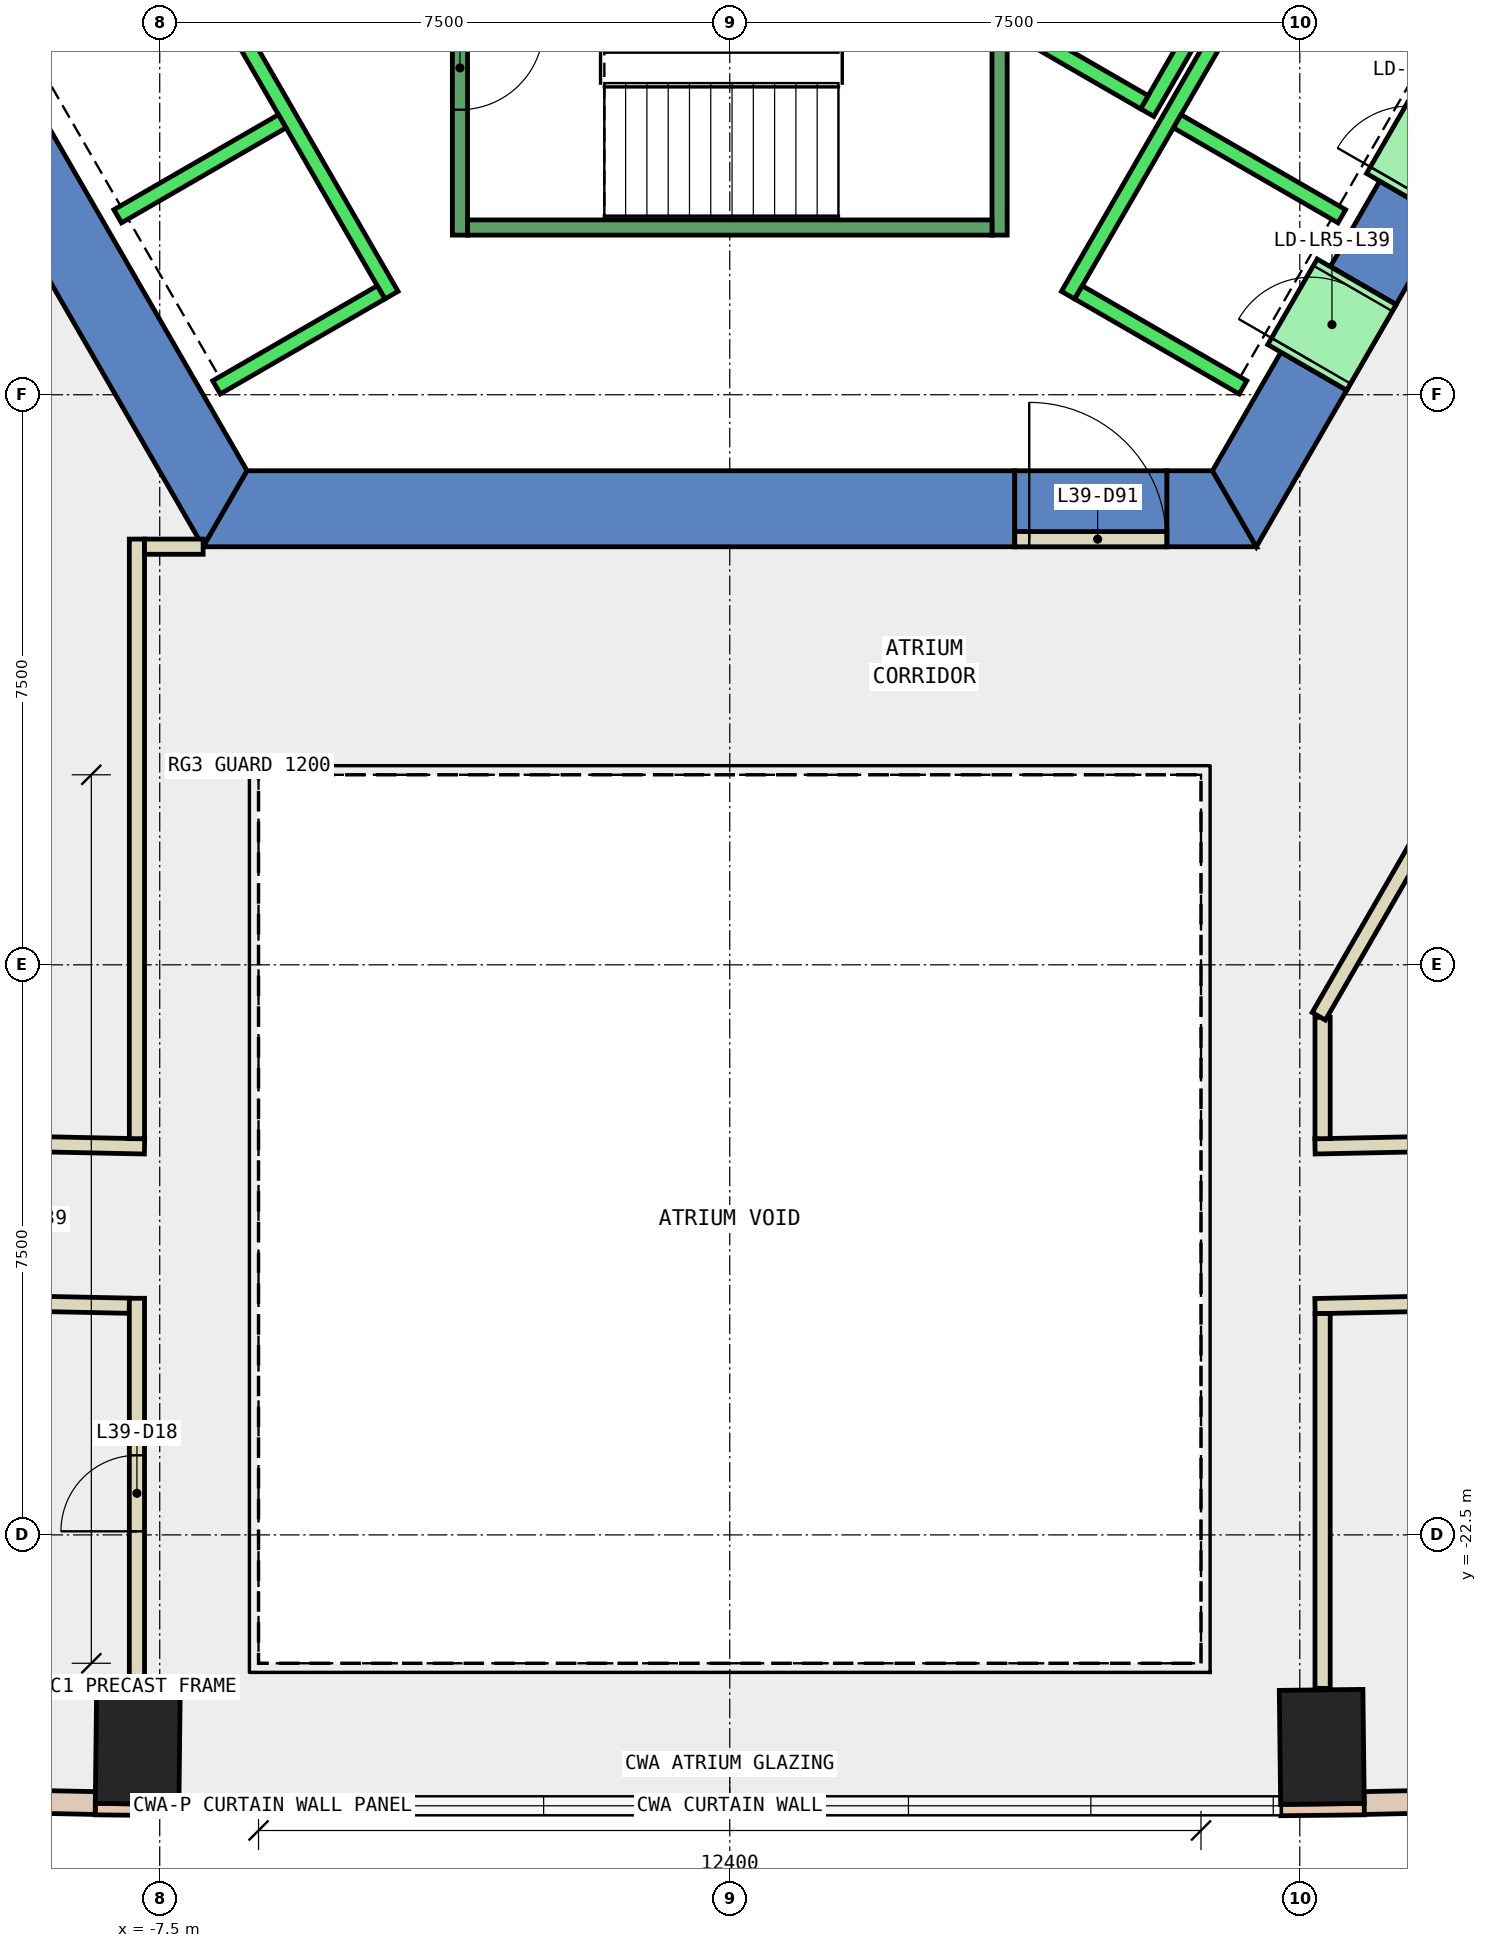
"""IFC4 building model, lengths in metres.
Left out: names, types, materials, properties, quantities, classifications, styles, units other than length and angle.
Written with IfcOpenShell. Run it as: python <this file> out.ifc"""

import sys

from ifc_helpers import new_model, si_unit, direction, frame, frame_2d, origin, origin_2d, place, context, subcontext, project, spatial, polyline, rectangle, outline, extrude, element, fill, save


model = new_model("IFC4")
c1 = context("Model", 3, precision=1e-05, world=origin(), true_north=direction((0.0, 1.0)))
c2 = subcontext(c1, "Body", "Model", "MODEL_VIEW")
j1 = project(units=[si_unit("LENGTHUNIT", "METRE"), si_unit("PLANEANGLEUNIT", "RADIAN")], contexts=[c1])
p1 = place(None, origin())
s1 = spatial("IfcSite", under=j1, at=p1, CompositionType="ELEMENT")
p2 = place(p1, origin())
s2 = spatial("IfcBuilding", under=s1, at=p2, CompositionType="ELEMENT")
p3 = place(p2, frame((0.0, 0.0, 176.0)))
s3 = spatial("IfcBuildingStorey", under=s2, at=p3, CompositionType="ELEMENT", Elevation=176.0)
for number, where, z_axis, x_axis in (
    (1, (-7.789, -25.289, -0.4), (0.0, 0.0, 1.0), (-1.0, 0.012, 0.0)),
    (2, (7.789, -25.289, -0.4), (0.0, 0.0, 1.0), (1.0, 0.012, 0.0)),
):
    element("IfcColumn", number, at=place(p3, frame(where, z_axis=z_axis, x_axis=x_axis)), inside=s3, PredefinedType="COLUMN", context=c2, shape_type="SweptSolid", body=[
        extrude(rectangle(XDim=1.1, YDim=1.5, at=origin_2d()), origin(), (0.0, 0.0, 1.0), 4.2),
    ])
p4 = place(p3, frame((0.0, 0.0, -0.4)))
e3 = element("IfcWall", 3, at=p4, inside=s3, PredefinedType="SHEAR", context=c2, shape_type="SweptSolid", body=[
    extrude(outline(polyline([(-13.856, 2.5), (-6.928, -9.5), (-6.351, -8.5), (-12.702, 2.5), (-13.856, 2.5)])), origin(), (0.0, 0.0, 1.0), 4.2),
])
p5 = place(p3, frame((0.0, 0.0, -0.4)))
e4 = element("IfcWall", 4, at=p5, inside=s3, PredefinedType="SHEAR", context=c2, shape_type="SweptSolid", body=[
    extrude(outline(polyline([(3.75, -9.5), (3.75, -8.5), (-6.351, -8.5), (-6.928, -9.5), (3.75, -9.5)])), origin(), (0.0, 0.0, 1.0), 4.2),
])
p6 = place(p3, frame((0.0, 0.0, -0.4)))
e5 = element("IfcWall", 5, at=p6, inside=s3, PredefinedType="SHEAR", context=c2, shape_type="SweptSolid", body=[
    extrude(outline(polyline([(5.75, -8.5), (5.75, -9.5), (6.928, -9.5), (6.351, -8.5), (5.75, -8.5)])), origin(), (0.0, 0.0, 1.0), 4.2),
])
p7 = place(p3, frame((0.0, 0.0, 3.6)))
e6 = element("IfcWall", 6, at=p7, inside=s3, PredefinedType="SHEAR", context=c2, shape_type="SweptSolid", body=[
    extrude(outline(polyline([(5.75, -9.5), (5.75, -8.5), (3.75, -8.5), (3.75, -9.5), (5.75, -9.5)])), origin(), (0.0, 0.0, 1.0), 0.2),
])
p8 = place(p3, frame((0.0, 0.0, -0.4)))
e7 = element("IfcWall", 7, at=p8, inside=s3, PredefinedType="SHEAR", context=c2, shape_type="SweptSolid", body=[
    extrude(outline(polyline([(8.117, -7.44), (7.252, -6.94), (6.351, -8.5), (6.928, -9.5), (8.117, -7.44)])), origin(), (0.0, 0.0, 1.0), 4.2),
])
p9 = place(p3, frame((0.0, 0.0, -0.4)))
e8 = element("IfcWall", 8, at=p9, inside=s3, PredefinedType="SHEAR", context=c2, shape_type="SweptSolid", body=[
    extrude(outline(polyline([(9.417, -5.189), (8.551, -4.689), (7.902, -5.814), (8.767, -6.314), (9.417, -5.189)])), origin(), (0.0, 0.0, 1.0), 4.2),
])
p10 = place(p3, frame((0.0, 0.0, 3.6)))
e9 = element("IfcWall", 9, at=p10, inside=s3, PredefinedType="SHEAR", context=c2, shape_type="SweptSolid", body=[
    extrude(outline(polyline([(8.767, -6.314), (7.902, -5.814), (7.252, -6.94), (8.117, -7.44), (8.767, -6.314)])), origin(), (0.0, 0.0, 1.0), 0.2),
])
p11 = place(p3, frame((0.0, 0.0, 3.6)))
e10 = element("IfcWall", 10, at=p11, inside=s3, PredefinedType="SHEAR", context=c2, shape_type="SweptSolid", body=[
    extrude(outline(polyline([(10.067, -4.063), (9.201, -3.563), (8.551, -4.689), (9.417, -5.189), (10.067, -4.063)])), origin(), (0.0, 0.0, 1.0), 0.2),
])
for number, where, z_axis, x_axis in (
    (11, (-8.349, -26.108, 0.0), (0.0, 0.0, 1.0), (1.0, -0.011, 0.0)),
    (12, (7.249, -26.12, 0.0), (0.0, 0.0, 1.0), (1.0, 0.011, 0.0)),
):
    element("IfcWall", number, at=place(p3, frame(where, z_axis=z_axis, x_axis=x_axis)), inside=s3, PredefinedType="STANDARD", context=c2, shape_type="SweptSolid", body=[
        extrude(rectangle(XDim=1.1, YDim=0.15, at=frame_2d((0.55, 0.0))), origin(), (0.0, 0.0, 1.0), 3.8),
    ])
p12 = place(p3, frame((-15.68, -25.875, 0.0), z_axis=(0.0, 0.0, 1.0), x_axis=(0.999782189413, -0.020870403275, 0.0)))
e13 = element("IfcWall", 13, at=p12, inside=s3, PredefinedType="STANDARD", context=c2, shape_type="SweptSolid", body=[
    extrude(rectangle(XDim=7.335, YDim=0.3, at=frame_2d((3.667, 0.0))), origin(), (0.0, 0.0, 1.0), 3.8),
])
p13 = place(p12, frame((0.634, 0.0, 0.9)))
e14 = element("IfcOpeningElement", 14, at=p13, cuts=e13, PredefinedType="OPENING", context=c2, shape_type="SweptSolid", body=[
    extrude(rectangle(XDim=2.4, YDim=2.6, at=frame_2d((1.2, 1.3))), frame((0.0, 0.16, 0.0), z_axis=(0.0, -1.0, 0.0), x_axis=(1.0, 0.0, 0.0)), (0.0, 0.0, 1.0), 0.32),
])
p14 = place(p12, frame((4.301, 0.0, 0.9)))
e15 = element("IfcOpeningElement", 15, at=p14, cuts=e13, PredefinedType="OPENING", context=c2, shape_type="SweptSolid", body=[
    extrude(rectangle(XDim=2.4, YDim=2.6, at=frame_2d((1.2, 1.3))), frame((0.0, 0.16, 0.0), z_axis=(0.0, -1.0, 0.0), x_axis=(1.0, 0.0, 0.0)), (0.0, 0.0, 1.0), 0.32),
])
p15 = place(p3, frame((8.347, -26.028, 0.0), z_axis=(0.0, 0.0, 1.0), x_axis=(0.999782189413, 0.020870403275, 0.0)))
e16 = element("IfcWall", 16, at=p15, inside=s3, PredefinedType="STANDARD", context=c2, shape_type="SweptSolid", body=[
    extrude(rectangle(XDim=7.335, YDim=0.3, at=frame_2d((3.667, 0.0))), origin(), (0.0, 0.0, 1.0), 3.8),
])
p16 = place(p15, frame((0.634, 0.0, 0.9)))
e17 = element("IfcOpeningElement", 17, at=p16, cuts=e16, PredefinedType="OPENING", context=c2, shape_type="SweptSolid", body=[
    extrude(rectangle(XDim=2.4, YDim=2.6, at=frame_2d((1.2, 1.3))), frame((0.0, 0.16, 0.0), z_axis=(0.0, -1.0, 0.0), x_axis=(1.0, 0.0, 0.0)), (0.0, 0.0, 1.0), 0.32),
])
p17 = place(p15, frame((4.301, 0.0, 0.9)))
e18 = element("IfcOpeningElement", 18, at=p17, cuts=e16, PredefinedType="OPENING", context=c2, shape_type="SweptSolid", body=[
    extrude(rectangle(XDim=2.4, YDim=2.6, at=frame_2d((1.2, 1.3))), frame((0.0, 0.16, 0.0), z_axis=(0.0, -1.0, 0.0), x_axis=(1.0, 0.0, 0.0)), (0.0, 0.0, 1.0), 0.32),
])
p18 = place(p3, frame((7.7, -17.389, 0.0), z_axis=(0.0, 0.0, 1.0), x_axis=(0.999782442794, 0.020858261713, 0.0)))
e19 = element("IfcWall", 19, at=p18, inside=s3, PredefinedType="PARTITIONING", context=c2, shape_type="SweptSolid", body=[
    extrude(rectangle(XDim=8.287, YDim=0.2, at=frame_2d((4.144, 0.0))), origin(), (0.0, 0.0, 1.0), 3.75),
])
p19 = place(p18, frame((3.644, 0.0, 0.0)))
e20 = element("IfcOpeningElement", 20, at=p19, cuts=e19, PredefinedType="OPENING", context=c2, shape_type="SweptSolid", body=[
    extrude(rectangle(XDim=1.0, YDim=2.1, at=frame_2d((0.5, 1.05))), frame((0.0, 0.11, 0.0), z_axis=(0.0, -1.0, 0.0), x_axis=(1.0, 0.0, 0.0)), (0.0, 0.0, 1.0), 0.22),
])
p20 = place(p3, frame((-15.985, -17.216, 0.0), z_axis=(0.0, 0.0, 1.0), x_axis=(0.999782442794, -0.020858261713, 0.0)))
e21 = element("IfcWall", 21, at=p20, inside=s3, PredefinedType="PARTITIONING", context=c2, shape_type="SweptSolid", body=[
    extrude(rectangle(XDim=8.287, YDim=0.2, at=frame_2d((4.144, 0.0))), origin(), (0.0, 0.0, 1.0), 3.75),
])
p21 = place(p20, frame((3.244, 0.0, 0.0)))
e22 = element("IfcOpeningElement", 22, at=p21, cuts=e21, PredefinedType="OPENING", context=c2, shape_type="SweptSolid", body=[
    extrude(rectangle(XDim=1.8, YDim=2.1, at=frame_2d((0.9, 1.05))), frame((0.0, 0.11, 0.0), z_axis=(0.0, -1.0, 0.0), x_axis=(1.0, 0.0, 0.0)), (0.0, 0.0, 1.0), 0.22),
])
p22 = place(p3, frame((16.045, -19.316, 0.0), z_axis=(0.0, 0.0, 1.0), x_axis=(-0.99978251073, -0.020855005124, 0.0)))
e23 = element("IfcWall", 23, at=p22, inside=s3, PredefinedType="PARTITIONING", context=c2, shape_type="SweptSolid", body=[
    extrude(rectangle(XDim=8.347, YDim=0.2, at=frame_2d((4.173, 0.0))), origin(), (0.0, 0.0, 1.0), 3.75),
])
p23 = place(p22, frame((3.673, 0.0, 0.0)))
e24 = element("IfcOpeningElement", 24, at=p23, cuts=e23, PredefinedType="OPENING", context=c2, shape_type="SweptSolid", body=[
    extrude(rectangle(XDim=1.0, YDim=2.1, at=frame_2d((0.5, 1.05))), frame((0.0, 0.11, 0.0), z_axis=(0.0, -1.0, 0.0), x_axis=(1.0, 0.0, 0.0)), (0.0, 0.0, 1.0), 0.22),
])
p24 = place(p3, frame((-7.9, -19.485, 0.0), z_axis=(0.0, 0.0, 1.0), x_axis=(-0.999784330337, 0.020767590419, 0.0)))
e25 = element("IfcWall", 25, at=p24, inside=s3, PredefinedType="PARTITIONING", context=c2, shape_type="SweptSolid", body=[
    extrude(rectangle(XDim=3.903, YDim=0.2, at=frame_2d((1.951, 0.0))), origin(), (0.0, 0.0, 1.0), 3.75),
])
p25 = place(p3, frame((7.8, -15.69, 0.0), z_axis=(0.0, 0.0, 1.0), x_axis=(0.0, -1.0, 0.0)))
e26 = element("IfcWall", 26, at=p25, inside=s3, PredefinedType="PARTITIONING", context=c2, shape_type="SweptSolid", body=[
    extrude(rectangle(XDim=1.597, YDim=0.2, at=frame_2d((0.799, 0.0))), origin(), (0.0, 0.0, 1.0), 3.75),
])
p26 = place(p3, frame((-7.8, -17.287, 0.0), z_axis=(0.0, 0.0, 1.0), x_axis=(0.0, 1.0, 0.0)))
e27 = element("IfcWall", 27, at=p26, inside=s3, PredefinedType="PARTITIONING", context=c2, shape_type="SweptSolid", body=[
    extrude(rectangle(XDim=7.888, YDim=0.2, at=frame_2d((3.944, 0.0))), origin(), (0.0, 0.0, 1.0), 3.75),
])
p27 = place(p3, frame((-7.7, -9.499, 0.0), z_axis=(0.0, 0.0, 1.0), x_axis=(1.0, 0.0, 0.0)))
e28 = element("IfcWall", 28, at=p27, inside=s3, PredefinedType="PARTITIONING", context=c2, shape_type="SweptSolid", body=[
    extrude(rectangle(XDim=0.771, YDim=0.2, at=frame_2d((0.385, 0.0))), origin(), (0.0, 0.0, 1.0), 3.75),
])
p28 = place(p3, frame((7.8, -19.588, 0.0), z_axis=(0.0, 0.0, 1.0), x_axis=(0.0, -1.0, 0.0)))
e29 = element("IfcWall", 29, at=p28, inside=s3, PredefinedType="PARTITIONING", context=c2, shape_type="SweptSolid", body=[
    extrude(rectangle(XDim=4.931, YDim=0.2, at=frame_2d((2.466, 0.0))), origin(), (0.0, 0.0, 1.0), 3.75),
])
p29 = place(p3, frame((-7.8, -24.519, 0.0), z_axis=(0.0, 0.0, 1.0), x_axis=(0.0, 1.0, 0.0)))
e30 = element("IfcWall", 30, at=p29, inside=s3, PredefinedType="PARTITIONING", context=c2, shape_type="SweptSolid", body=[
    extrude(rectangle(XDim=5.132, YDim=0.2, at=frame_2d((2.566, 0.0))), origin(), (0.0, 0.0, 1.0), 3.75),
])
p30 = place(p29, frame((2.066, 0.0, 0.0)))
e31 = element("IfcOpeningElement", 31, at=p30, cuts=e30, PredefinedType="OPENING", context=c2, shape_type="SweptSolid", body=[
    extrude(rectangle(XDim=1.0, YDim=2.1, at=frame_2d((0.5, 1.05))), frame((0.0, 0.11, 0.0), z_axis=(0.0, -1.0, 0.0), x_axis=(1.0, 0.0, 0.0)), (0.0, 0.0, 1.0), 0.22),
])
p31 = place(p3, frame((12.476, -7.491, 0.0), z_axis=(0.0, 0.0, 1.0), x_axis=(-0.499989258007, -0.866031605588, 0.0)))
e32 = element("IfcWall", 32, at=p31, inside=s3, PredefinedType="PARTITIONING", context=c2, shape_type="SweptSolid", body=[
    extrude(rectangle(XDim=9.452, YDim=0.2, at=frame_2d((4.726, 0.0))), origin(), (0.0, 0.0, 1.0), 3.75),
])
p32 = place(p3, frame((3.75, -9.4, 0.0), z_axis=(0.0, 0.0, 1.0), x_axis=(1.0, 0.0, 0.0)))
e33 = element("IfcWall", 33, at=p32, inside=s3, PredefinedType="PARTITIONING", context=c2, shape_type="SweptSolid", body=[
    extrude(rectangle(XDim=2.0, YDim=0.2, at=frame_2d((1.0, 0.0))), origin(), (0.0, 0.0, 1.0), 2.4),
])
p33 = place(p32, frame((0.19, 0.0, 0.0)))
e34 = element("IfcOpeningElement", 34, at=p33, cuts=e33, PredefinedType="OPENING", context=c2, shape_type="SweptSolid", body=[
    extrude(rectangle(XDim=1.8, YDim=2.1, at=frame_2d((0.9, 1.05))), frame((0.0, 0.11, 0.0), z_axis=(0.0, -1.0, 0.0), x_axis=(1.0, 0.0, 0.0)), (0.0, 0.0, 1.0), 0.22),
])
p34 = place(p3, frame((-9.751, 2.99, 0.0), z_axis=(0.0, 0.0, 1.0), x_axis=(0.50000090737, -0.866024879913, 0.0)))
e35 = element("IfcWall", 35, at=p34, inside=s3, PredefinedType="STANDARD", context=c2, shape_type="SweptSolid", body=[
    extrude(rectangle(XDim=10.6, YDim=0.2, at=frame_2d((5.3, 0.0))), origin(), (0.0, 0.0, 1.0), 3.75),
])
for number, where, z_axis, x_axis in (
    (36, (-5.888, -3.902, 0.0), (0.0, 0.0, 1.0), (-0.866, -0.5, 0.0)),
    (37, (-4.588, -6.153, 0.0), (0.0, 0.0, 1.0), (-0.866, -0.5, 0.0)),
):
    element("IfcWall", number, at=place(p3, frame(where, z_axis=z_axis, x_axis=x_axis)), inside=s3, PredefinedType="STANDARD", context=c2, shape_type="SweptSolid", body=[
        extrude(rectangle(XDim=2.5, YDim=0.2, at=frame_2d((1.25, 0.0))), origin(), (0.0, 0.0, 1.0), 3.75),
    ])
p35 = place(p3, frame((5.492, -3.788, 0.0), z_axis=(0.0, 0.0, 1.0), x_axis=(0.500011755427, 0.866018616679, 0.0)))
e38 = element("IfcWall", 38, at=p35, inside=s3, PredefinedType="STANDARD", context=c2, shape_type="SweptSolid", body=[
    extrude(rectangle(XDim=2.8, YDim=0.2, at=frame_2d((1.4, 0.0))), origin(), (0.0, 0.0, 1.0), 3.75),
])
p36 = place(p3, frame((3.377, -2.452, 0.0), z_axis=(0.0, 0.0, 1.0), x_axis=(0.865955154139, -0.50012165622, 0.0)))
e39 = element("IfcWall", 39, at=p36, inside=s3, PredefinedType="STANDARD", context=c2, shape_type="SweptSolid", body=[
    extrude(rectangle(XDim=2.4, YDim=0.2, at=frame_2d((1.2, 0.0))), origin(), (0.0, 0.0, 1.0), 3.75),
])
p37 = place(p3, frame((4.451, -6.19, 0.0), z_axis=(0.0, 0.0, 1.0), x_axis=(0.50000090737, 0.866024879913, 0.0)))
e40 = element("IfcWall", 40, at=p37, inside=s3, PredefinedType="STANDARD", context=c2, shape_type="SweptSolid", body=[
    extrude(rectangle(XDim=10.6, YDim=0.2, at=frame_2d((5.3, 0.0))), origin(), (0.0, 0.0, 1.0), 3.75),
])
for number, where, z_axis, x_axis in (
    (41, (4.588, -6.153, 0.0), (0.0, 0.0, 1.0), (0.866, -0.5, 0.0)),
    (42, (5.888, -3.902, 0.0), (0.0, 0.0, 1.0), (0.866, -0.5, 0.0)),
):
    element("IfcWall", number, at=place(p3, frame(where, z_axis=z_axis, x_axis=x_axis)), inside=s3, PredefinedType="STANDARD", context=c2, shape_type="SweptSolid", body=[
        extrude(rectangle(XDim=2.5, YDim=0.2, at=frame_2d((1.25, 0.0))), origin(), (0.0, 0.0, 1.0), 3.75),
    ])
p38 = place(p3, frame((7.598, -7.14, 0.0), z_axis=(0.0, 0.0, 1.0), x_axis=(0.500362116554, 0.865816234728, 0.0)))
e43 = element("IfcWall", 43, at=p38, inside=s3, PredefinedType="STANDARD", context=c2, shape_type="SweptSolid", body=[
    extrude(rectangle(XDim=1.299, YDim=1.2, at=frame_2d((0.65, 0.0))), origin(), (0.0, 0.0, 1.0), 2.4),
])
p39 = place(p38, frame((0.1, 0.0, 0.0)))
e44 = element("IfcOpeningElement", 44, at=p39, cuts=e43, PredefinedType="OPENING", context=c2, shape_type="SweptSolid", body=[
    extrude(rectangle(XDim=1.1, YDim=2.3, at=frame_2d((0.55, 1.15))), frame((0.0, 0.61, 0.0), z_axis=(0.0, -1.0, 0.0), x_axis=(1.0, 0.0, 0.0)), (0.0, 0.0, 1.0), 1.22),
])
p40 = place(p3, frame((8.898, -4.889, 0.0), z_axis=(0.0, 0.0, 1.0), x_axis=(0.500036693733, 0.866004217611, 0.0)))
e45 = element("IfcWall", 45, at=p40, inside=s3, PredefinedType="STANDARD", context=c2, shape_type="SweptSolid", body=[
    extrude(rectangle(XDim=1.3, YDim=1.2, at=frame_2d((0.65, 0.0))), origin(), (0.0, 0.0, 1.0), 2.4),
])
p41 = place(p40, frame((0.1, 0.0, 0.0)))
e46 = element("IfcOpeningElement", 46, at=p41, cuts=e45, PredefinedType="OPENING", context=c2, shape_type="SweptSolid", body=[
    extrude(rectangle(XDim=1.1, YDim=2.3, at=frame_2d((0.55, 1.15))), frame((0.0, 0.61, 0.0), z_axis=(0.0, -1.0, 0.0), x_axis=(1.0, 0.0, 0.0)), (0.0, 0.0, 1.0), 1.22),
])
p42 = place(p3, frame((-3.55, -1.0, 0.0), z_axis=(0.0, 0.0, 1.0), x_axis=(0.0, -1.0, 0.0)))
e47 = element("IfcWall", 47, at=p42, inside=s3, PredefinedType="STANDARD", context=c2, shape_type="SweptSolid", body=[
    extrude(rectangle(XDim=4.4, YDim=0.2, at=frame_2d((2.2, 0.0))), origin(), (0.0, 0.0, 1.0), 3.75),
])
p43 = place(p42, frame((1.65, 0.0, 0.0)))
e48 = element("IfcOpeningElement", 48, at=p43, cuts=e47, PredefinedType="OPENING", context=c2, shape_type="SweptSolid", body=[
    extrude(rectangle(XDim=1.1, YDim=2.2, at=frame_2d((0.55, 1.1))), frame((0.0, 0.11, 0.0), z_axis=(0.0, -1.0, 0.0), x_axis=(1.0, 0.0, 0.0)), (0.0, 0.0, 1.0), 0.22),
])
p44 = place(p3, frame((3.55, -2.667, 0.0), z_axis=(0.0, 0.0, 1.0), x_axis=(0.0, -1.0, 0.0)))
e49 = element("IfcWall", 49, at=p44, inside=s3, PredefinedType="STANDARD", context=c2, shape_type="SweptSolid", body=[
    extrude(rectangle(XDim=2.733, YDim=0.2, at=frame_2d((1.366, 0.0))), origin(), (0.0, 0.0, 1.0), 3.75),
])
p45 = place(p3, frame((-3.45, -5.3, 0.0), z_axis=(0.0, 0.0, 1.0), x_axis=(1.0, 0.0, 0.0)))
e50 = element("IfcWall", 50, at=p45, inside=s3, PredefinedType="STANDARD", context=c2, shape_type="SweptSolid", body=[
    extrude(rectangle(XDim=6.9, YDim=0.2, at=frame_2d((3.45, 0.0))), origin(), (0.0, 0.0, 1.0), 3.75),
])
p46 = place(p30, origin())
e51 = element("IfcDoor", 51, at=p46, inside=s3, OperationType="SINGLE_SWING_LEFT", PredefinedType="DOOR", context=c2, shape_type="SweptSolid", body=[
    extrude(rectangle(XDim=1.0, YDim=2.1, at=frame_2d((0.5, 1.05))), frame((0.0, 0.025, 0.0), z_axis=(0.0, -1.0, 0.0), x_axis=(1.0, 0.0, 0.0)), (0.0, 0.0, 1.0), 0.05),
])
fill(e31, e51)
p47 = place(p33, origin())
e52 = element("IfcDoor", 52, at=p47, inside=s3, OperationType="DOUBLE_DOOR_SINGLE_SWING", PredefinedType="DOOR", context=c2, shape_type="SweptSolid", body=[
    extrude(rectangle(XDim=1.8, YDim=2.1, at=frame_2d((0.9, 1.05))), frame((0.0, 0.025, 0.0), z_axis=(0.0, -1.0, 0.0), x_axis=(1.0, 0.0, 0.0)), (0.0, 0.0, 1.0), 0.05),
])
fill(e34, e52)
p48 = place(p39, origin())
e53 = element("IfcDoor", 53, at=p48, inside=s3, OperationType="SLIDING_TO_LEFT", PredefinedType="DOOR", context=c2, shape_type="SweptSolid", body=[
    extrude(rectangle(XDim=1.1, YDim=2.3, at=frame_2d((0.55, 1.15))), frame((0.0, 0.025, 0.0), z_axis=(0.0, -1.0, 0.0), x_axis=(1.0, 0.0, 0.0)), (0.0, 0.0, 1.0), 0.05),
])
fill(e44, e53)
p49 = place(p43, origin())
e54 = element("IfcDoor", 54, at=p49, inside=s3, OperationType="SINGLE_SWING_LEFT", PredefinedType="DOOR", context=c2, shape_type="SweptSolid", body=[
    extrude(rectangle(XDim=1.1, YDim=2.2, at=frame_2d((0.55, 1.1))), frame((0.0, 0.025, 0.0), z_axis=(0.0, -1.0, 0.0), x_axis=(1.0, 0.0, 0.0)), (0.0, 0.0, 1.0), 0.05),
])
fill(e48, e54)
save(model, sys.argv[1])
